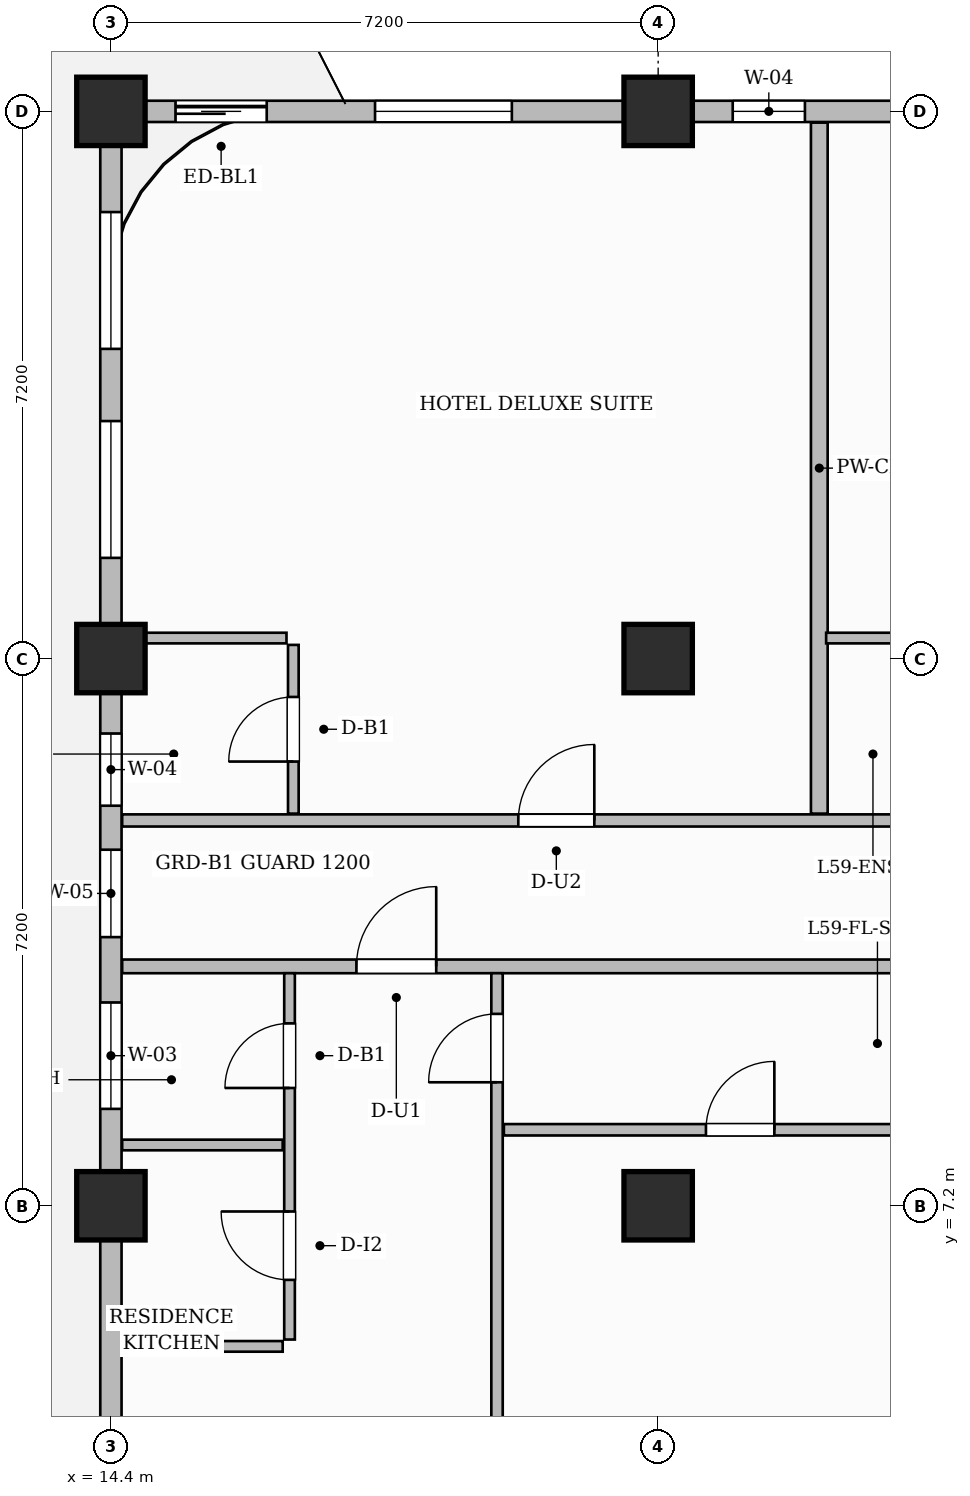
"""IFC4 building model, lengths in metres.
Left out: names, types, materials, properties, quantities, classifications, styles, units other than length and angle.
Written with IfcOpenShell. Run it as: python <this file> out.ifc"""

import sys

from ifc_helpers import new_model, si_unit, direction, frame, frame_2d, origin, origin_2d, place, context, subcontext, project, spatial, rectangle, extrude, source, transform, mapped, element, fill, save


model = new_model("IFC4")
c1 = context("Model", 3, precision=1e-05, world=origin(), true_north=direction((0.0, 1.0)))
c2 = subcontext(c1, "Body", "Model", "MODEL_VIEW")
j1 = project(units=[si_unit("LENGTHUNIT", "METRE"), si_unit("PLANEANGLEUNIT", "RADIAN")], contexts=[c1])
p1 = place(None, origin())
s1 = spatial("IfcSite", under=j1, at=p1, CompositionType="ELEMENT")
p2 = place(p1, origin())
s2 = spatial("IfcBuilding", under=s1, at=p2, CompositionType="ELEMENT")
p3 = place(p2, frame((0.0, 0.0, 236.55)))
s3 = spatial("IfcBuildingStorey", under=s2, at=p3, CompositionType="ELEMENT", Elevation=236.55)
m1 = source(origin(), c2, "Body", "SweptSolid", [
    extrude(rectangle(XDim=0.9, YDim=0.9, at=origin_2d()), origin(), (0.0, 0.0, 1.0), 3.85),
])
for number, where, z_axis, x_axis in (
    (1, (14.4, 7.2, 0.0), (0.0, 0.0, 1.0), (1.0, 0.0, 0.0)),
    (2, (14.4, 14.4, 0.0), (0.0, 0.0, 1.0), (1.0, 0.0, 0.0)),
    (3, (14.4, 21.6, 0.0), (0.0, 0.0, 1.0), (1.0, 0.0, 0.0)),
    (4, (21.6, 7.2, 0.0), (0.0, 0.0, 1.0), (1.0, 0.0, 0.0)),
    (5, (21.6, 14.4, 0.0), (0.0, 0.0, 1.0), (1.0, 0.0, 0.0)),
    (6, (21.6, 21.6, 0.0), (0.0, 0.0, 1.0), (1.0, 0.0, 0.0)),
):
    element("IfcColumn", number, at=place(p3, frame(where, z_axis=z_axis, x_axis=x_axis)), inside=s3, PredefinedType="COLUMN", context=c2, shape_type="MappedRepresentation", body=[
        mapped(m1, transform((0.0, 0.0, 0.0), scale=1.0)),
    ])
p4 = place(p3, frame((14.548, 10.35, 0.0), z_axis=(0.0, 0.0, 1.0), x_axis=(1.0, 0.0, 0.0)))
e7 = element("IfcWall", 7, at=p4, inside=s3, PredefinedType="PARTITIONING", context=c2, shape_type="SweptSolid", body=[
    extrude(rectangle(XDim=15.562, YDim=0.18, at=frame_2d((7.781, 0.0))), origin(), (0.0, 0.0, 1.0), 3.6),
])
p5 = place(p4, frame((3.082, 0.0, 0.0)))
e8 = element("IfcOpeningElement", 8, at=p5, cuts=e7, PredefinedType="OPENING", context=c2, shape_type="SweptSolid", body=[
    extrude(rectangle(XDim=1.05, YDim=2.25, at=frame_2d((0.525, 1.125))), frame((0.0, 0.1, 0.0), z_axis=(0.0, -1.0, 0.0), x_axis=(1.0, 0.0, 0.0)), (0.0, 0.0, 1.0), 0.2),
])
p6 = place(p4, frame((12.652, 0.0, 0.0)))
e9 = element("IfcOpeningElement", 9, at=p6, cuts=e7, PredefinedType="OPENING", context=c2, shape_type="SweptSolid", body=[
    extrude(rectangle(XDim=1.4, YDim=2.35, at=frame_2d((0.7, 1.175))), frame((0.0, 0.1, 0.0), z_axis=(0.0, -1.0, 0.0), x_axis=(1.0, 0.0, 0.0)), (0.0, 0.0, 1.0), 0.2),
])
p7 = place(p3, frame((14.548, 12.27, 0.0), z_axis=(0.0, 0.0, 1.0), x_axis=(1.0, 0.0, 0.0)))
e10 = element("IfcWall", 10, at=p7, inside=s3, PredefinedType="PARTITIONING", context=c2, shape_type="SweptSolid", body=[
    extrude(rectangle(XDim=15.562, YDim=0.16, at=frame_2d((7.781, 0.0))), origin(), (0.0, 0.0, 1.0), 3.6),
])
p8 = place(p7, frame((5.212, 0.0, 0.0)))
e11 = element("IfcOpeningElement", 11, at=p8, cuts=e10, PredefinedType="OPENING", context=c2, shape_type="SweptSolid", body=[
    extrude(rectangle(XDim=1.0, YDim=2.2, at=frame_2d((0.5, 1.1))), frame((0.0, 0.09, 0.0), z_axis=(0.0, -1.0, 0.0), x_axis=(1.0, 0.0, 0.0)), (0.0, 0.0, 1.0), 0.18),
])
p9 = place(p7, frame((13.037, 0.0, 0.0)))
e12 = element("IfcOpeningElement", 12, at=p9, cuts=e10, PredefinedType="OPENING", context=c2, shape_type="SweptSolid", body=[
    extrude(rectangle(XDim=1.05, YDim=2.25, at=frame_2d((0.525, 1.125))), frame((0.0, 0.09, 0.0), z_axis=(0.0, -1.0, 0.0), x_axis=(1.0, 0.0, 0.0)), (0.0, 0.0, 1.0), 0.18),
])
p10 = place(p3, frame((16.75, 5.44, 0.0), z_axis=(0.0, 0.0, 1.0), x_axis=(0.0, 1.0, 0.0)))
e13 = element("IfcWall", 13, at=p10, inside=s3, PredefinedType="PARTITIONING", context=c2, shape_type="SweptSolid", body=[
    extrude(rectangle(XDim=4.82, YDim=0.14, at=frame_2d((2.41, 0.0))), origin(), (0.0, 0.0, 1.0), 3.6),
])
p11 = place(p10, frame((0.785, 0.0, 0.0)))
e14 = element("IfcOpeningElement", 14, at=p11, cuts=e13, PredefinedType="OPENING", context=c2, shape_type="SweptSolid", body=[
    extrude(rectangle(XDim=0.9, YDim=2.15, at=frame_2d((0.45, 1.075))), frame((0.0, 0.08, 0.0), z_axis=(0.0, -1.0, 0.0), x_axis=(1.0, 0.0, 0.0)), (0.0, 0.0, 1.0), 0.16),
])
p12 = place(p10, frame((3.31, 0.0, 0.0)))
e15 = element("IfcOpeningElement", 15, at=p12, cuts=e13, PredefinedType="OPENING", context=c2, shape_type="SweptSolid", body=[
    extrude(rectangle(XDim=0.85, YDim=2.1, at=frame_2d((0.425, 1.05))), frame((0.0, 0.08, 0.0), z_axis=(0.0, -1.0, 0.0), x_axis=(1.0, 0.0, 0.0)), (0.0, 0.0, 1.0), 0.16),
])
for number, where, z_axis, x_axis in (
    (16, (14.548, 8.0, 0.0), (0.0, 0.0, 1.0), (1.0, 0.0, 0.0)),
    (17, (14.548, 5.35, 0.0), (0.0, 0.0, 1.0), (1.0, 0.0, 0.0)),
):
    element("IfcWall", number, at=place(p3, frame(where, z_axis=z_axis, x_axis=x_axis)), inside=s3, PredefinedType="PARTITIONING", context=c2, shape_type="SweptSolid", body=[
        extrude(rectangle(XDim=2.112, YDim=0.14, at=frame_2d((1.056, 0.0))), origin(), (0.0, 0.0, 1.0), 3.6),
    ])
p13 = place(p3, frame((19.48, 0.148, 0.0), z_axis=(0.0, 0.0, 1.0), x_axis=(0.0, 1.0, 0.0)))
e18 = element("IfcWall", 18, at=p13, inside=s3, PredefinedType="PARTITIONING", context=c2, shape_type="SweptSolid", body=[
    extrude(rectangle(XDim=10.112, YDim=0.15, at=frame_2d((5.056, 0.0))), origin(), (0.0, 0.0, 1.0), 3.6),
])
p14 = place(p13, frame((8.677, 0.0, 0.0)))
e19 = element("IfcOpeningElement", 19, at=p14, cuts=e18, PredefinedType="OPENING", context=c2, shape_type="SweptSolid", body=[
    extrude(rectangle(XDim=0.9, YDim=2.15, at=frame_2d((0.45, 1.075))), frame((0.0, 0.085, 0.0), z_axis=(0.0, -1.0, 0.0), x_axis=(1.0, 0.0, 0.0)), (0.0, 0.0, 1.0), 0.17),
])
p15 = place(p3, frame((19.57, 8.2, 0.0), z_axis=(0.0, 0.0, 1.0), x_axis=(1.0, 0.0, 0.0)))
e20 = element("IfcWall", 20, at=p15, inside=s3, PredefinedType="PARTITIONING", context=c2, shape_type="SweptSolid", body=[
    extrude(rectangle(XDim=5.94, YDim=0.15, at=frame_2d((2.97, 0.0))), origin(), (0.0, 0.0, 1.0), 3.6),
])
p16 = place(p15, frame((2.659, 0.0, 0.0)))
e21 = element("IfcOpeningElement", 21, at=p16, cuts=e20, PredefinedType="OPENING", context=c2, shape_type="SweptSolid", body=[
    extrude(rectangle(XDim=0.9, YDim=2.15, at=frame_2d((0.45, 1.075))), frame((0.0, 0.085, 0.0), z_axis=(0.0, -1.0, 0.0), x_axis=(1.0, 0.0, 0.0)), (0.0, 0.0, 1.0), 0.17),
])
p17 = place(p3, frame((23.72, 12.36, 0.0), z_axis=(0.0, 0.0, 1.0), x_axis=(0.0, 1.0, 0.0)))
e22 = element("IfcWall", 22, at=p17, inside=s3, PredefinedType="PARTITIONING", context=c2, shape_type="SweptSolid", body=[
    extrude(rectangle(XDim=9.092, YDim=0.22, at=frame_2d((4.546, 0.0))), origin(), (0.0, 0.0, 1.0), 3.6),
])
p18 = place(p3, frame((16.8, 12.36, 0.0), z_axis=(0.0, 0.0, 1.0), x_axis=(0.0, 1.0, 0.0)))
e23 = element("IfcWall", 23, at=p18, inside=s3, PredefinedType="PARTITIONING", context=c2, shape_type="SweptSolid", body=[
    extrude(rectangle(XDim=2.22, YDim=0.14, at=frame_2d((1.11, 0.0))), origin(), (0.0, 0.0, 1.0), 3.6),
])
p19 = place(p18, frame((0.685, 0.0, 0.0)))
e24 = element("IfcOpeningElement", 24, at=p19, cuts=e23, PredefinedType="OPENING", context=c2, shape_type="SweptSolid", body=[
    extrude(rectangle(XDim=0.85, YDim=2.1, at=frame_2d((0.425, 1.05))), frame((0.0, 0.08, 0.0), z_axis=(0.0, -1.0, 0.0), x_axis=(1.0, 0.0, 0.0)), (0.0, 0.0, 1.0), 0.16),
])
for number, where, z_axis, x_axis in (
    (25, (14.59, 14.67, 0.0), (0.0, 0.0, 1.0), (1.0, 0.0, 0.0)),
    (26, (23.81, 14.67, 0.0), (0.0, 0.0, 1.0), (1.0, 0.0, 0.0)),
):
    element("IfcWall", number, at=place(p3, frame(where, z_axis=z_axis, x_axis=x_axis)), inside=s3, PredefinedType="PARTITIONING", context=c2, shape_type="SweptSolid", body=[
        extrude(rectangle(XDim=2.12, YDim=0.14, at=frame_2d((1.06, 0.0))), origin(), (0.0, 0.0, 1.0), 3.135),
    ])
p20 = place(p3, frame((14.4, 21.6, 0.0), z_axis=(0.0, 0.0, 1.0), x_axis=(1.0, 0.0, 0.0)))
e27 = element("IfcWall", 27, at=p20, inside=s3, PredefinedType="SOLIDWALL", context=c2, shape_type="SweptSolid", body=[
    extrude(rectangle(XDim=35.4, YDim=0.28, at=frame_2d((17.7, 0.0))), origin(), (0.0, 0.0, 1.0), 3.135),
])
p21 = place(p20, frame((0.85, 0.0, 0.0)))
e28 = element("IfcOpeningElement", 28, at=p21, cuts=e27, PredefinedType="OPENING", context=c2, shape_type="SweptSolid", body=[
    extrude(rectangle(XDim=1.2, YDim=2.2, at=frame_2d((0.6, 1.1))), frame((0.0, 0.15, 0.0), z_axis=(0.0, -1.0, 0.0), x_axis=(1.0, 0.0, 0.0)), (0.0, 0.0, 1.0), 0.3),
])
p22 = place(p20, frame((3.475, 0.0, 0.8)))
e29 = element("IfcOpeningElement", 29, at=p22, cuts=e27, PredefinedType="OPENING", context=c2, shape_type="SweptSolid", body=[
    extrude(rectangle(XDim=1.8, YDim=1.85, at=frame_2d((0.9, 0.925))), frame((0.0, 0.15, 0.0), z_axis=(0.0, -1.0, 0.0), x_axis=(1.0, 0.0, 0.0)), (0.0, 0.0, 1.0), 0.3),
])
p23 = place(p20, frame((8.181, 0.0, 0.8)))
e30 = element("IfcOpeningElement", 30, at=p23, cuts=e27, PredefinedType="OPENING", context=c2, shape_type="SweptSolid", body=[
    extrude(rectangle(XDim=0.95, YDim=1.75, at=frame_2d((0.475, 0.875))), frame((0.0, 0.15, 0.0), z_axis=(0.0, -1.0, 0.0), x_axis=(1.0, 0.0, 0.0)), (0.0, 0.0, 1.0), 0.3),
])
p24 = place(p20, frame((10.564, 0.0, 0.8)))
e31 = element("IfcOpeningElement", 31, at=p24, cuts=e27, PredefinedType="OPENING", context=c2, shape_type="SweptSolid", body=[
    extrude(rectangle(XDim=1.8, YDim=1.85, at=frame_2d((0.9, 0.925))), frame((0.0, 0.15, 0.0), z_axis=(0.0, -1.0, 0.0), x_axis=(1.0, 0.0, 0.0)), (0.0, 0.0, 1.0), 0.3),
])
p25 = place(p20, frame((16.651, 0.0, 0.8)))
e32 = element("IfcOpeningElement", 32, at=p25, cuts=e27, PredefinedType="OPENING", context=c2, shape_type="SweptSolid", body=[
    extrude(rectangle(XDim=1.8, YDim=1.85, at=frame_2d((0.9, 0.925))), frame((0.0, 0.15, 0.0), z_axis=(0.0, -1.0, 0.0), x_axis=(1.0, 0.0, 0.0)), (0.0, 0.0, 1.0), 0.3),
])
p26 = place(p20, frame((21.725, 0.0, 0.8)))
e33 = element("IfcOpeningElement", 33, at=p26, cuts=e27, PredefinedType="OPENING", context=c2, shape_type="SweptSolid", body=[
    extrude(rectangle(XDim=1.8, YDim=1.85, at=frame_2d((0.9, 0.925))), frame((0.0, 0.15, 0.0), z_axis=(0.0, -1.0, 0.0), x_axis=(1.0, 0.0, 0.0)), (0.0, 0.0, 1.0), 0.3),
])
p27 = place(p20, frame((24.475, 0.0, 0.8)))
e34 = element("IfcOpeningElement", 34, at=p27, cuts=e27, PredefinedType="OPENING", context=c2, shape_type="SweptSolid", body=[
    extrude(rectangle(XDim=1.8, YDim=1.85, at=frame_2d((0.9, 0.925))), frame((0.0, 0.15, 0.0), z_axis=(0.0, -1.0, 0.0), x_axis=(1.0, 0.0, 0.0)), (0.0, 0.0, 1.0), 0.3),
])
p28 = place(p20, frame((29.531, 0.0, 0.8)))
e35 = element("IfcOpeningElement", 35, at=p28, cuts=e27, PredefinedType="OPENING", context=c2, shape_type="SweptSolid", body=[
    extrude(rectangle(XDim=1.8, YDim=1.85, at=frame_2d((0.9, 0.925))), frame((0.0, 0.15, 0.0), z_axis=(0.0, -1.0, 0.0), x_axis=(1.0, 0.0, 0.0)), (0.0, 0.0, 1.0), 0.3),
])
p29 = place(p20, frame((32.277, 0.0, 0.8)))
e36 = element("IfcOpeningElement", 36, at=p29, cuts=e27, PredefinedType="OPENING", context=c2, shape_type="SweptSolid", body=[
    extrude(rectangle(XDim=1.8, YDim=1.85, at=frame_2d((0.9, 0.925))), frame((0.0, 0.15, 0.0), z_axis=(0.0, -1.0, 0.0), x_axis=(1.0, 0.0, 0.0)), (0.0, 0.0, 1.0), 0.3),
])
p30 = place(p3, frame((14.4, 0.05, 0.0), z_axis=(0.0, 0.0, 1.0), x_axis=(0.0, 1.0, 0.0)))
e37 = element("IfcWall", 37, at=p30, inside=s3, PredefinedType="SOLIDWALL", context=c2, shape_type="SweptSolid", body=[
    extrude(rectangle(XDim=21.5, YDim=0.28, at=frame_2d((10.75, 0.0))), origin(), (0.0, 0.0, 1.0), 3.135),
])
p31 = place(p30, frame((2.121, 0.0, 0.8)))
e38 = element("IfcOpeningElement", 38, at=p31, cuts=e37, PredefinedType="OPENING", context=c2, shape_type="SweptSolid", body=[
    extrude(rectangle(XDim=1.8, YDim=1.85, at=frame_2d((0.9, 0.925))), frame((0.0, 0.15, 0.0), z_axis=(0.0, -1.0, 0.0), x_axis=(1.0, 0.0, 0.0)), (0.0, 0.0, 1.0), 0.3),
])
p32 = place(p30, frame((8.425, 0.0, 0.8)))
e39 = element("IfcOpeningElement", 39, at=p32, cuts=e37, PredefinedType="OPENING", context=c2, shape_type="SweptSolid", body=[
    extrude(rectangle(XDim=1.4, YDim=1.85, at=frame_2d((0.7, 0.925))), frame((0.0, 0.15, 0.0), z_axis=(0.0, -1.0, 0.0), x_axis=(1.0, 0.0, 0.0)), (0.0, 0.0, 1.0), 0.3),
])
p33 = place(p30, frame((10.685, 0.0, 0.8)))
e40 = element("IfcOpeningElement", 40, at=p33, cuts=e37, PredefinedType="OPENING", context=c2, shape_type="SweptSolid", body=[
    extrude(rectangle(XDim=1.15, YDim=1.8, at=frame_2d((0.575, 0.9))), frame((0.0, 0.15, 0.0), z_axis=(0.0, -1.0, 0.0), x_axis=(1.0, 0.0, 0.0)), (0.0, 0.0, 1.0), 0.3),
])
p34 = place(p30, frame((12.414, 0.0, 0.8)))
e41 = element("IfcOpeningElement", 41, at=p34, cuts=e37, PredefinedType="OPENING", context=c2, shape_type="SweptSolid", body=[
    extrude(rectangle(XDim=0.95, YDim=1.75, at=frame_2d((0.475, 0.875))), frame((0.0, 0.15, 0.0), z_axis=(0.0, -1.0, 0.0), x_axis=(1.0, 0.0, 0.0)), (0.0, 0.0, 1.0), 0.3),
])
p35 = place(p30, frame((15.675, 0.0, 0.8)))
e42 = element("IfcOpeningElement", 42, at=p35, cuts=e37, PredefinedType="OPENING", context=c2, shape_type="SweptSolid", body=[
    extrude(rectangle(XDim=1.8, YDim=1.85, at=frame_2d((0.9, 0.925))), frame((0.0, 0.15, 0.0), z_axis=(0.0, -1.0, 0.0), x_axis=(1.0, 0.0, 0.0)), (0.0, 0.0, 1.0), 0.3),
])
p36 = place(p30, frame((18.425, 0.0, 0.8)))
e43 = element("IfcOpeningElement", 43, at=p36, cuts=e37, PredefinedType="OPENING", context=c2, shape_type="SweptSolid", body=[
    extrude(rectangle(XDim=1.8, YDim=1.85, at=frame_2d((0.9, 0.925))), frame((0.0, 0.15, 0.0), z_axis=(0.0, -1.0, 0.0), x_axis=(1.0, 0.0, 0.0)), (0.0, 0.0, 1.0), 0.3),
])
m2 = source(origin(), c2, "Body", "SweptSolid", [
    extrude(rectangle(XDim=0.9, YDim=2.15, at=frame_2d((0.45, 1.075))), frame((0.0, 0.025, 0.0), z_axis=(0.0, -1.0, 0.0), x_axis=(1.0, 0.0, 0.0)), (0.0, 0.0, 1.0), 0.05),
])
p37 = place(p11, origin())
e44 = element("IfcDoor", 44, at=p37, inside=s3, OperationType="SINGLE_SWING_RIGHT", PredefinedType="DOOR", context=c2, shape_type="MappedRepresentation", body=[
    mapped(m2, transform((0.0, 0.0, 0.0), scale=1.0)),
])
fill(e14, e44)
m3 = source(origin(), c2, "Body", "SweptSolid", [
    extrude(rectangle(XDim=0.85, YDim=2.1, at=frame_2d((0.425, 1.05))), frame((0.0, 0.025, 0.0), z_axis=(0.0, -1.0, 0.0), x_axis=(1.0, 0.0, 0.0)), (0.0, 0.0, 1.0), 0.05),
])
p38 = place(p12, origin())
e45 = element("IfcDoor", 45, at=p38, inside=s3, OperationType="SINGLE_SWING_LEFT", PredefinedType="DOOR", context=c2, shape_type="MappedRepresentation", body=[
    mapped(m3, transform((0.0, 0.0, 0.0), scale=1.0)),
])
fill(e15, e45)
m4 = source(origin(), c2, "Body", "SweptSolid", [
    extrude(rectangle(XDim=1.05, YDim=2.25, at=frame_2d((0.525, 1.125))), frame((0.0, 0.025, 0.0), z_axis=(0.0, -1.0, 0.0), x_axis=(1.0, 0.0, 0.0)), (0.0, 0.0, 1.0), 0.05),
])
p39 = place(p5, origin())
e46 = element("IfcDoor", 46, at=p39, inside=s3, OperationType="SINGLE_SWING_RIGHT", PredefinedType="DOOR", context=c2, shape_type="MappedRepresentation", body=[
    mapped(m4, transform((0.0, 0.0, 0.0), scale=1.0)),
])
fill(e8, e46)
p40 = place(p14, origin())
e47 = element("IfcDoor", 47, at=p40, inside=s3, OperationType="SINGLE_SWING_LEFT", PredefinedType="DOOR", context=c2, shape_type="MappedRepresentation", body=[
    mapped(m2, transform((0.0, 0.0, 0.0), scale=1.0)),
])
fill(e19, e47)
p41 = place(p16, origin())
e48 = element("IfcDoor", 48, at=p41, inside=s3, OperationType="SINGLE_SWING_RIGHT", PredefinedType="DOOR", context=c2, shape_type="MappedRepresentation", body=[
    mapped(m2, transform((0.0, 0.0, 0.0), scale=1.0)),
])
fill(e21, e48)
p42 = place(p19, origin())
e49 = element("IfcDoor", 49, at=p42, inside=s3, OperationType="SINGLE_SWING_LEFT", PredefinedType="DOOR", context=c2, shape_type="MappedRepresentation", body=[
    mapped(m3, transform((0.0, 0.0, 0.0), scale=1.0)),
])
fill(e24, e49)
m5 = source(origin(), c2, "Body", "SweptSolid", [
    extrude(rectangle(XDim=1.0, YDim=2.2, at=frame_2d((0.5, 1.1))), frame((0.0, 0.025, 0.0), z_axis=(0.0, -1.0, 0.0), x_axis=(1.0, 0.0, 0.0)), (0.0, 0.0, 1.0), 0.05),
])
p43 = place(p8, origin())
e50 = element("IfcDoor", 50, at=p43, inside=s3, OperationType="SINGLE_SWING_RIGHT", PredefinedType="DOOR", context=c2, shape_type="MappedRepresentation", body=[
    mapped(m5, transform((0.0, 0.0, 0.0), scale=1.0)),
])
fill(e11, e50)
m6 = source(origin(), c2, "Body", "SweptSolid", [
    extrude(rectangle(XDim=1.2, YDim=2.2, at=frame_2d((0.6, 1.1))), frame((0.0, 0.025, 0.0), z_axis=(0.0, -1.0, 0.0), x_axis=(1.0, 0.0, 0.0)), (0.0, 0.0, 1.0), 0.05),
])
p44 = place(p21, origin())
e51 = element("IfcDoor", 51, at=p44, inside=s3, OperationType="SLIDING_TO_LEFT", PredefinedType="DOOR", context=c2, shape_type="MappedRepresentation", body=[
    mapped(m6, transform((0.0, 0.0, 0.0), scale=1.0)),
])
fill(e28, e51)
m7 = source(origin(), c2, "Body", "SweptSolid", [
    extrude(rectangle(XDim=1.8, YDim=1.85, at=frame_2d((0.9, 0.925))), frame((0.0, 0.03, 0.0), z_axis=(0.0, -1.0, 0.0), x_axis=(1.0, 0.0, 0.0)), (0.0, 0.0, 1.0), 0.06),
])
p45 = place(p22, origin())
e52 = element("IfcWindow", 52, at=p45, inside=s3, PartitioningType="DOUBLE_PANEL_VERTICAL", PredefinedType="WINDOW", context=c2, shape_type="MappedRepresentation", body=[
    mapped(m7, transform((0.0, 0.0, 0.0), scale=1.0)),
])
fill(e29, e52)
m8 = source(origin(), c2, "Body", "SweptSolid", [
    extrude(rectangle(XDim=0.95, YDim=1.75, at=frame_2d((0.475, 0.875))), frame((0.0, 0.03, 0.0), z_axis=(0.0, -1.0, 0.0), x_axis=(1.0, 0.0, 0.0)), (0.0, 0.0, 1.0), 0.06),
])
p46 = place(p23, origin())
e53 = element("IfcWindow", 53, at=p46, inside=s3, PartitioningType="SINGLE_PANEL", PredefinedType="WINDOW", context=c2, shape_type="MappedRepresentation", body=[
    mapped(m8, transform((0.0, 0.0, 0.0), scale=1.0)),
])
fill(e30, e53)
m9 = source(origin(), c2, "Body", "SweptSolid", [
    extrude(rectangle(XDim=1.4, YDim=1.85, at=frame_2d((0.7, 0.925))), frame((0.0, 0.03, 0.0), z_axis=(0.0, -1.0, 0.0), x_axis=(1.0, 0.0, 0.0)), (0.0, 0.0, 1.0), 0.06),
])
p47 = place(p32, origin())
e54 = element("IfcWindow", 54, at=p47, inside=s3, PartitioningType="SINGLE_PANEL", PredefinedType="WINDOW", context=c2, shape_type="MappedRepresentation", body=[
    mapped(m9, transform((0.0, 0.0, 0.0), scale=1.0)),
])
fill(e39, e54)
m10 = source(origin(), c2, "Body", "SweptSolid", [
    extrude(rectangle(XDim=1.15, YDim=1.8, at=frame_2d((0.575, 0.9))), frame((0.0, 0.03, 0.0), z_axis=(0.0, -1.0, 0.0), x_axis=(1.0, 0.0, 0.0)), (0.0, 0.0, 1.0), 0.06),
])
p48 = place(p33, origin())
e55 = element("IfcWindow", 55, at=p48, inside=s3, PartitioningType="SINGLE_PANEL", PredefinedType="WINDOW", context=c2, shape_type="MappedRepresentation", body=[
    mapped(m10, transform((0.0, 0.0, 0.0), scale=1.0)),
])
fill(e40, e55)
p49 = place(p34, origin())
e56 = element("IfcWindow", 56, at=p49, inside=s3, PartitioningType="SINGLE_PANEL", PredefinedType="WINDOW", context=c2, shape_type="MappedRepresentation", body=[
    mapped(m8, transform((0.0, 0.0, 0.0), scale=1.0)),
])
fill(e41, e56)
p50 = place(p35, origin())
e57 = element("IfcWindow", 57, at=p50, inside=s3, PartitioningType="DOUBLE_PANEL_VERTICAL", PredefinedType="WINDOW", context=c2, shape_type="MappedRepresentation", body=[
    mapped(m7, transform((0.0, 0.0, 0.0), scale=1.0)),
])
fill(e42, e57)
p51 = place(p36, origin())
e58 = element("IfcWindow", 58, at=p51, inside=s3, PartitioningType="DOUBLE_PANEL_VERTICAL", PredefinedType="WINDOW", context=c2, shape_type="MappedRepresentation", body=[
    mapped(m7, transform((0.0, 0.0, 0.0), scale=1.0)),
])
fill(e43, e58)
save(model, sys.argv[1])
